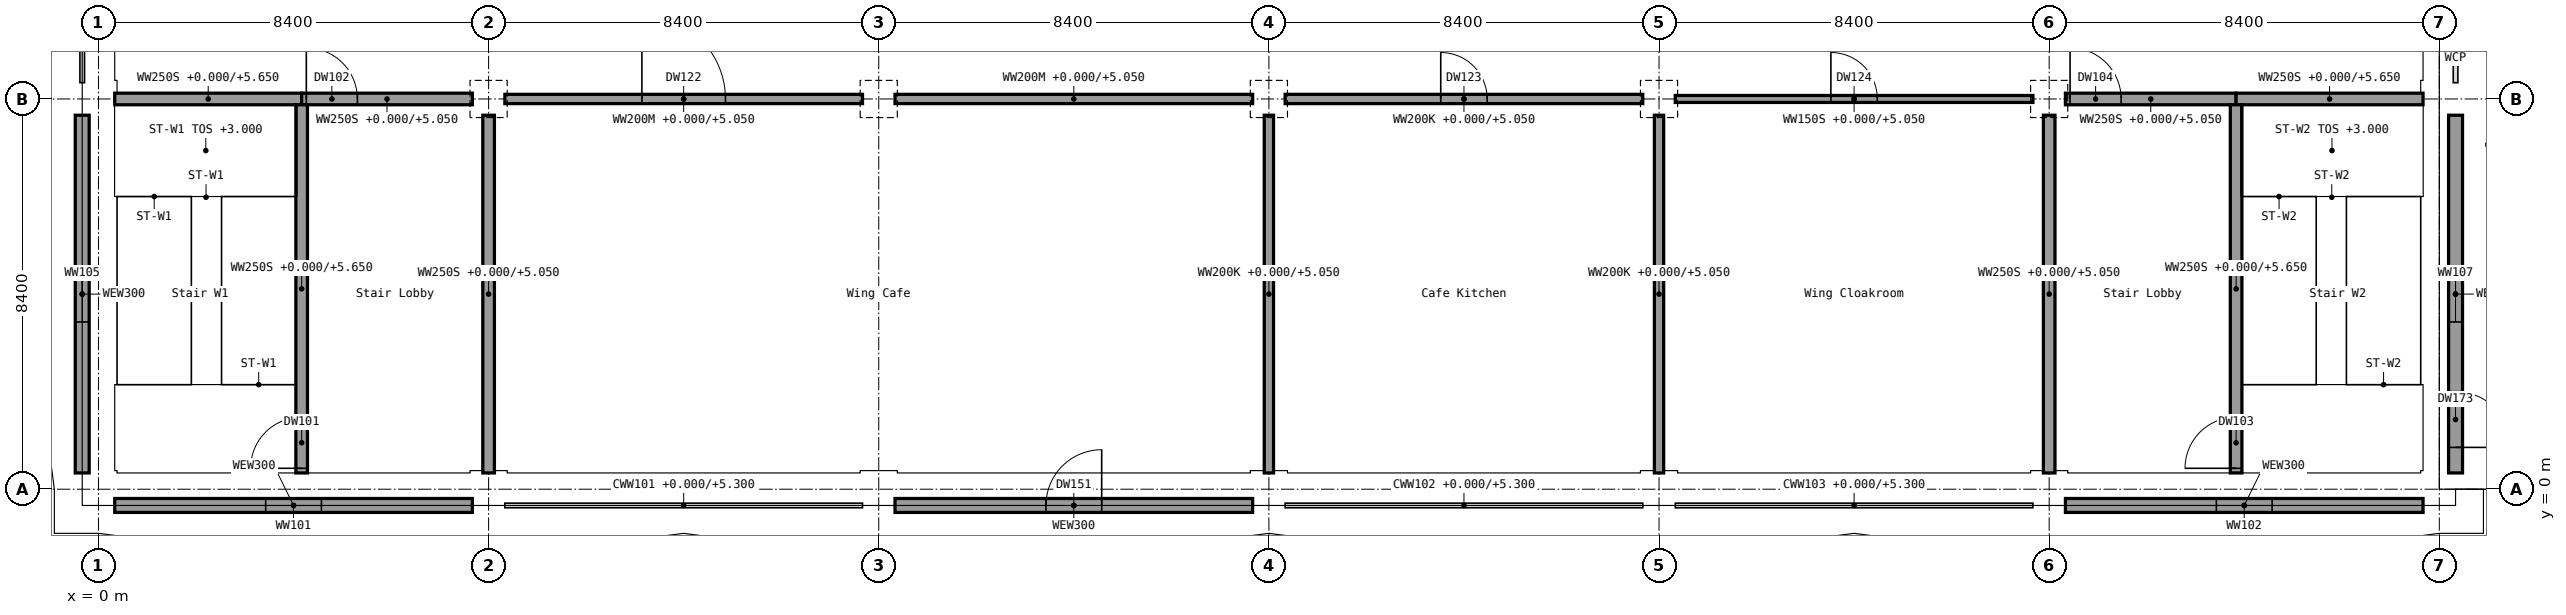
"""IFC4 building model, lengths in metres.
Left out: names, types, materials, properties, quantities, classifications, styles, units other than length and angle.
Written with IfcOpenShell. Run it as: python <this file> out.ifc"""

import sys

from ifc_helpers import new_model, si_unit, direction, frame, frame_2d, origin, origin_2d, place, context, subcontext, project, spatial, rectangle, extrude, element, fill, save


model = new_model("IFC4")
c1 = context("Model", 3, precision=1e-05, world=origin(), true_north=direction((0.0, 1.0)))
c2 = subcontext(c1, "Body", "Model", "MODEL_VIEW")
j1 = project(units=[si_unit("LENGTHUNIT", "METRE"), si_unit("PLANEANGLEUNIT", "RADIAN")], contexts=[c1])
p1 = place(None, origin())
s1 = spatial("IfcSite", under=j1, at=p1, CompositionType="ELEMENT")
p2 = place(p1, origin())
s2 = spatial("IfcBuilding", under=s1, at=p2, CompositionType="ELEMENT")
p3 = place(p2, origin())
s3 = spatial("IfcBuildingStorey", under=s2, at=p3, CompositionType="ELEMENT", Elevation=0.0)
for number, where, z_axis, x_axis in (
    (1, (0.0, 0.0, 0.0), (0.0, 0.0, 1.0), (1.0, 0.0, 0.0)),
    (2, (0.0, 8.4, 0.0), (0.0, 0.0, 1.0), (1.0, 0.0, 0.0)),
    (3, (8.4, 0.0, 0.0), (0.0, 0.0, 1.0), (1.0, 0.0, 0.0)),
    (4, (8.4, 8.4, 0.0), (0.0, 0.0, 1.0), (1.0, 0.0, 0.0)),
    (5, (16.8, 0.0, 0.0), (0.0, 0.0, 1.0), (1.0, 0.0, 0.0)),
    (6, (16.8, 8.4, 0.0), (0.0, 0.0, 1.0), (1.0, 0.0, 0.0)),
    (7, (25.2, 0.0, 0.0), (0.0, 0.0, 1.0), (1.0, 0.0, 0.0)),
    (8, (25.2, 8.4, 0.0), (0.0, 0.0, 1.0), (1.0, 0.0, 0.0)),
    (9, (33.6, 0.0, 0.0), (0.0, 0.0, 1.0), (1.0, 0.0, 0.0)),
    (10, (33.6, 8.4, 0.0), (0.0, 0.0, 1.0), (1.0, 0.0, 0.0)),
    (11, (42.0, 0.0, 0.0), (0.0, 0.0, 1.0), (1.0, 0.0, 0.0)),
    (12, (42.0, 8.4, 0.0), (0.0, 0.0, 1.0), (1.0, 0.0, 0.0)),
    (13, (50.4, 0.0, 0.0), (0.0, 0.0, 1.0), (1.0, 0.0, 0.0)),
    (14, (50.4, 8.4, 0.0), (0.0, 0.0, 1.0), (1.0, 0.0, 0.0)),
):
    element("IfcColumn", number, at=place(p3, frame(where, z_axis=z_axis, x_axis=x_axis)), inside=s3, PredefinedType="COLUMN", context=c2, shape_type="SweptSolid", body=[
        extrude(rectangle(XDim=0.7, YDim=0.7, at=origin_2d()), origin(), (0.0, 0.0, 1.0), 6.0),
    ])
p4 = place(p3, frame((0.35, -0.35, 0.0), z_axis=(0.0, 0.0, 1.0), x_axis=(1.0, 0.0, 0.0)))
e15 = element("IfcWall", 15, at=p4, inside=s3, PredefinedType="SOLIDWALL", context=c2, shape_type="SweptSolid", body=[
    extrude(rectangle(XDim=7.7, YDim=0.3, at=frame_2d((3.85, 0.0))), origin(), (0.0, 0.0, 1.0), 5.3),
])
p5 = place(p4, frame((3.25, 0.0, 1.0)))
e16 = element("IfcOpeningElement", 16, at=p5, cuts=e15, PredefinedType="OPENING", context=c2, shape_type="SweptSolid", body=[
    extrude(rectangle(XDim=1.2, YDim=1.5, at=frame_2d((0.6, 0.75))), frame((0.0, 0.15, 0.0), z_axis=(0.0, -1.0, 0.0), x_axis=(1.0, 0.0, 0.0)), (0.0, 0.0, 1.0), 0.3),
])
p6 = place(p3, frame((17.15, -0.35, 0.0), z_axis=(0.0, 0.0, 1.0), x_axis=(1.0, 0.0, 0.0)))
e17 = element("IfcWall", 17, at=p6, inside=s3, PredefinedType="SOLIDWALL", context=c2, shape_type="SweptSolid", body=[
    extrude(rectangle(XDim=7.7, YDim=0.3, at=frame_2d((3.85, 0.0))), origin(), (0.0, 0.0, 1.0), 5.3),
])
p7 = place(p6, frame((3.25, 0.0, 0.0)))
e18 = element("IfcOpeningElement", 18, at=p7, cuts=e17, PredefinedType="OPENING", context=c2, shape_type="SweptSolid", body=[
    extrude(rectangle(XDim=1.2, YDim=2.1, at=frame_2d((0.6, 1.05))), frame((0.0, 0.15, 0.0), z_axis=(0.0, -1.0, 0.0), x_axis=(1.0, 0.0, 0.0)), (0.0, 0.0, 1.0), 0.3),
])
p8 = place(p3, frame((42.35, -0.35, 0.0), z_axis=(0.0, 0.0, 1.0), x_axis=(1.0, 0.0, 0.0)))
e19 = element("IfcWall", 19, at=p8, inside=s3, PredefinedType="SOLIDWALL", context=c2, shape_type="SweptSolid", body=[
    extrude(rectangle(XDim=7.7, YDim=0.3, at=frame_2d((3.85, 0.0))), origin(), (0.0, 0.0, 1.0), 5.3),
])
p9 = place(p8, frame((3.25, 0.0, 1.0)))
e20 = element("IfcOpeningElement", 20, at=p9, cuts=e19, PredefinedType="OPENING", context=c2, shape_type="SweptSolid", body=[
    extrude(rectangle(XDim=1.2, YDim=1.5, at=frame_2d((0.6, 0.75))), frame((0.0, 0.15, 0.0), z_axis=(0.0, -1.0, 0.0), x_axis=(1.0, 0.0, 0.0)), (0.0, 0.0, 1.0), 0.3),
])
p10 = place(p3, frame((-0.35, 0.35, 0.0), z_axis=(0.0, 0.0, 1.0), x_axis=(0.0, 1.0, 0.0)))
e21 = element("IfcWall", 21, at=p10, inside=s3, PredefinedType="SOLIDWALL", context=c2, shape_type="SweptSolid", body=[
    extrude(rectangle(XDim=7.7, YDim=0.3, at=frame_2d((3.85, 0.0))), origin(), (0.0, 0.0, 1.0), 5.3),
])
p11 = place(p10, frame((3.25, 0.0, 1.0)))
e22 = element("IfcOpeningElement", 22, at=p11, cuts=e21, PredefinedType="OPENING", context=c2, shape_type="SweptSolid", body=[
    extrude(rectangle(XDim=1.2, YDim=1.5, at=frame_2d((0.6, 0.75))), frame((0.0, 0.15, 0.0), z_axis=(0.0, -1.0, 0.0), x_axis=(1.0, 0.0, 0.0)), (0.0, 0.0, 1.0), 0.3),
])
p12 = place(p3, frame((50.75, 0.35, 0.0), z_axis=(0.0, 0.0, 1.0), x_axis=(0.0, 1.0, 0.0)))
e23 = element("IfcWall", 23, at=p12, inside=s3, PredefinedType="SOLIDWALL", context=c2, shape_type="SweptSolid", body=[
    extrude(rectangle(XDim=7.7, YDim=0.3, at=frame_2d((3.85, 0.0))), origin(), (0.0, 0.0, 1.0), 5.3),
])
p13 = place(p12, frame((3.25, 0.0, 1.0)))
e24 = element("IfcOpeningElement", 24, at=p13, cuts=e23, PredefinedType="OPENING", context=c2, shape_type="SweptSolid", body=[
    extrude(rectangle(XDim=1.2, YDim=1.5, at=frame_2d((0.6, 0.75))), frame((0.0, 0.15, 0.0), z_axis=(0.0, -1.0, 0.0), x_axis=(1.0, 0.0, 0.0)), (0.0, 0.0, 1.0), 0.3),
])
p14 = place(p12, frame((0.55, 0.0, 0.0)))
e25 = element("IfcOpeningElement", 25, at=p14, cuts=e23, PredefinedType="OPENING", context=c2, shape_type="SweptSolid", body=[
    extrude(rectangle(XDim=1.2, YDim=2.1, at=frame_2d((0.6, 1.05))), frame((0.0, 0.15, 0.0), z_axis=(0.0, -1.0, 0.0), x_axis=(1.0, 0.0, 0.0)), (0.0, 0.0, 1.0), 0.3),
])
p15 = place(p3, frame((0.35, 8.4, 0.0), z_axis=(0.0, 0.0, 1.0), x_axis=(1.0, 0.0, 0.0)))
e26 = element("IfcWall", 26, at=p15, inside=s3, PredefinedType="SHEAR", context=c2, shape_type="SweptSolid", body=[
    extrude(rectangle(XDim=4.025, YDim=0.25, at=frame_2d((2.012, 0.0))), origin(), (0.0, 0.0, 1.0), 5.65),
])
p16 = place(p3, frame((4.375, 8.4, 0.0), z_axis=(0.0, 0.0, 1.0), x_axis=(1.0, 0.0, 0.0)))
e27 = element("IfcWall", 27, at=p16, inside=s3, PredefinedType="SHEAR", context=c2, shape_type="SweptSolid", body=[
    extrude(rectangle(XDim=3.675, YDim=0.25, at=frame_2d((1.837, 0.0))), origin(), (0.0, 0.0, 1.0), 5.05),
])
p17 = place(p16, frame((0.1, 0.0, 0.0)))
e28 = element("IfcOpeningElement", 28, at=p17, cuts=e27, PredefinedType="OPENING", context=c2, shape_type="SweptSolid", body=[
    extrude(rectangle(XDim=1.1, YDim=2.1, at=frame_2d((0.55, 1.05))), frame((0.0, 0.125, 0.0), z_axis=(0.0, -1.0, 0.0), x_axis=(1.0, 0.0, 0.0)), (0.0, 0.0, 1.0), 0.25),
])
p18 = place(p3, frame((8.75, 8.4, 0.0), z_axis=(0.0, 0.0, 1.0), x_axis=(1.0, 0.0, 0.0)))
e29 = element("IfcWall", 29, at=p18, inside=s3, PredefinedType="PARTITIONING", context=c2, shape_type="SweptSolid", body=[
    extrude(rectangle(XDim=7.7, YDim=0.2, at=frame_2d((3.85, 0.0))), origin(), (0.0, 0.0, 1.0), 5.05),
])
p19 = place(p18, frame((2.95, 0.0, 0.0)))
e30 = element("IfcOpeningElement", 30, at=p19, cuts=e29, PredefinedType="OPENING", context=c2, shape_type="SweptSolid", body=[
    extrude(rectangle(XDim=1.8, YDim=2.1, at=frame_2d((0.9, 1.05))), frame((0.0, 0.1, 0.0), z_axis=(0.0, -1.0, 0.0), x_axis=(1.0, 0.0, 0.0)), (0.0, 0.0, 1.0), 0.2),
])
p20 = place(p3, frame((17.15, 8.4, 0.0), z_axis=(0.0, 0.0, 1.0), x_axis=(1.0, 0.0, 0.0)))
e31 = element("IfcWall", 31, at=p20, inside=s3, PredefinedType="PARTITIONING", context=c2, shape_type="SweptSolid", body=[
    extrude(rectangle(XDim=7.7, YDim=0.2, at=frame_2d((3.85, 0.0))), origin(), (0.0, 0.0, 1.0), 5.05),
])
p21 = place(p3, frame((25.55, 8.4, 0.0), z_axis=(0.0, 0.0, 1.0), x_axis=(1.0, 0.0, 0.0)))
e32 = element("IfcWall", 32, at=p21, inside=s3, PredefinedType="SOLIDWALL", context=c2, shape_type="SweptSolid", body=[
    extrude(rectangle(XDim=7.7, YDim=0.2, at=frame_2d((3.85, 0.0))), origin(), (0.0, 0.0, 1.0), 5.05),
])
p22 = place(p21, frame((3.35, 0.0, 0.0)))
e33 = element("IfcOpeningElement", 33, at=p22, cuts=e32, PredefinedType="OPENING", context=c2, shape_type="SweptSolid", body=[
    extrude(rectangle(XDim=1.0, YDim=2.1, at=frame_2d((0.5, 1.05))), frame((0.0, 0.1, 0.0), z_axis=(0.0, -1.0, 0.0), x_axis=(1.0, 0.0, 0.0)), (0.0, 0.0, 1.0), 0.2),
])
p23 = place(p3, frame((33.95, 8.4, 0.0), z_axis=(0.0, 0.0, 1.0), x_axis=(1.0, 0.0, 0.0)))
e34 = element("IfcWall", 34, at=p23, inside=s3, PredefinedType="PARTITIONING", context=c2, shape_type="SweptSolid", body=[
    extrude(rectangle(XDim=7.7, YDim=0.15, at=frame_2d((3.85, 0.0))), origin(), (0.0, 0.0, 1.0), 5.05),
])
p24 = place(p23, frame((3.35, 0.0, 0.0)))
e35 = element("IfcOpeningElement", 35, at=p24, cuts=e34, PredefinedType="OPENING", context=c2, shape_type="SweptSolid", body=[
    extrude(rectangle(XDim=1.0, YDim=2.1, at=frame_2d((0.5, 1.05))), frame((0.0, 0.075, 0.0), z_axis=(0.0, -1.0, 0.0), x_axis=(1.0, 0.0, 0.0)), (0.0, 0.0, 1.0), 0.15),
])
p25 = place(p3, frame((42.35, 8.4, 0.0), z_axis=(0.0, 0.0, 1.0), x_axis=(1.0, 0.0, 0.0)))
e36 = element("IfcWall", 36, at=p25, inside=s3, PredefinedType="SHEAR", context=c2, shape_type="SweptSolid", body=[
    extrude(rectangle(XDim=3.675, YDim=0.25, at=frame_2d((1.837, 0.0))), origin(), (0.0, 0.0, 1.0), 5.05),
])
p26 = place(p25, frame((0.1, 0.0, 0.0)))
e37 = element("IfcOpeningElement", 37, at=p26, cuts=e36, PredefinedType="OPENING", context=c2, shape_type="SweptSolid", body=[
    extrude(rectangle(XDim=1.1, YDim=2.1, at=frame_2d((0.55, 1.05))), frame((0.0, 0.125, 0.0), z_axis=(0.0, -1.0, 0.0), x_axis=(1.0, 0.0, 0.0)), (0.0, 0.0, 1.0), 0.25),
])
p27 = place(p3, frame((46.025, 8.4, 0.0), z_axis=(0.0, 0.0, 1.0), x_axis=(1.0, 0.0, 0.0)))
e38 = element("IfcWall", 38, at=p27, inside=s3, PredefinedType="SHEAR", context=c2, shape_type="SweptSolid", body=[
    extrude(rectangle(XDim=4.025, YDim=0.25, at=frame_2d((2.013, 0.0))), origin(), (0.0, 0.0, 1.0), 5.65),
])
p28 = place(p3, frame((4.375, 0.35, 0.0), z_axis=(0.0, 0.0, 1.0), x_axis=(0.0, 1.0, 0.0)))
e39 = element("IfcWall", 39, at=p28, inside=s3, PredefinedType="SHEAR", context=c2, shape_type="SweptSolid", body=[
    extrude(rectangle(XDim=7.925, YDim=0.25, at=frame_2d((3.962, 0.0))), origin(), (0.0, 0.0, 1.0), 5.65),
])
p29 = place(p28, frame((0.1, 0.0, 0.0)))
e40 = element("IfcOpeningElement", 40, at=p29, cuts=e39, PredefinedType="OPENING", context=c2, shape_type="SweptSolid", body=[
    extrude(rectangle(XDim=1.1, YDim=2.1, at=frame_2d((0.55, 1.05))), frame((0.0, 0.125, 0.0), z_axis=(0.0, -1.0, 0.0), x_axis=(1.0, 0.0, 0.0)), (0.0, 0.0, 1.0), 0.25),
])
p30 = place(p3, frame((8.4, 0.35, 0.0), z_axis=(0.0, 0.0, 1.0), x_axis=(0.0, 1.0, 0.0)))
e41 = element("IfcWall", 41, at=p30, inside=s3, PredefinedType="SHEAR", context=c2, shape_type="SweptSolid", body=[
    extrude(rectangle(XDim=7.7, YDim=0.25, at=frame_2d((3.85, 0.0))), origin(), (0.0, 0.0, 1.0), 5.05),
])
for number, where, z_axis, x_axis in (
    (42, (25.2, 0.35, 0.0), (0.0, 0.0, 1.0), (0.0, 1.0, 0.0)),
    (43, (33.6, 0.35, 0.0), (0.0, 0.0, 1.0), (0.0, 1.0, 0.0)),
):
    element("IfcWall", number, at=place(p3, frame(where, z_axis=z_axis, x_axis=x_axis)), inside=s3, PredefinedType="SOLIDWALL", context=c2, shape_type="SweptSolid", body=[
        extrude(rectangle(XDim=7.7, YDim=0.2, at=frame_2d((3.85, 0.0))), origin(), (0.0, 0.0, 1.0), 5.05),
    ])
p31 = place(p3, frame((42.0, 0.35, 0.0), z_axis=(0.0, 0.0, 1.0), x_axis=(0.0, 1.0, 0.0)))
e44 = element("IfcWall", 44, at=p31, inside=s3, PredefinedType="SHEAR", context=c2, shape_type="SweptSolid", body=[
    extrude(rectangle(XDim=7.7, YDim=0.25, at=frame_2d((3.85, 0.0))), origin(), (0.0, 0.0, 1.0), 5.05),
])
p32 = place(p3, frame((46.025, 0.35, 0.0), z_axis=(0.0, 0.0, 1.0), x_axis=(0.0, 1.0, 0.0)))
e45 = element("IfcWall", 45, at=p32, inside=s3, PredefinedType="SHEAR", context=c2, shape_type="SweptSolid", body=[
    extrude(rectangle(XDim=7.925, YDim=0.25, at=frame_2d((3.962, 0.0))), origin(), (0.0, 0.0, 1.0), 5.65),
])
p33 = place(p32, frame((0.1, 0.0, 0.0)))
e46 = element("IfcOpeningElement", 46, at=p33, cuts=e45, PredefinedType="OPENING", context=c2, shape_type="SweptSolid", body=[
    extrude(rectangle(XDim=1.1, YDim=2.1, at=frame_2d((0.55, 1.05))), frame((0.0, 0.125, 0.0), z_axis=(0.0, -1.0, 0.0), x_axis=(1.0, 0.0, 0.0)), (0.0, 0.0, 1.0), 0.25),
])
p34 = place(p5, origin())
e47 = element("IfcWindow", 47, at=p34, inside=s3, PartitioningType="SINGLE_PANEL", PredefinedType="WINDOW", context=c2, shape_type="SweptSolid", body=[
    extrude(rectangle(XDim=1.2, YDim=1.5, at=frame_2d((0.6, 0.75))), frame((0.0, 0.03, 0.0), z_axis=(0.0, -1.0, 0.0), x_axis=(1.0, 0.0, 0.0)), (0.0, 0.0, 1.0), 0.06),
])
fill(e16, e47)
p35 = place(p7, origin())
e48 = element("IfcDoor", 48, at=p35, inside=s3, OperationType="SINGLE_SWING_RIGHT", PredefinedType="DOOR", context=c2, shape_type="SweptSolid", body=[
    extrude(rectangle(XDim=1.2, YDim=2.1, at=frame_2d((0.6, 1.05))), frame((0.0, 0.025, 0.0), z_axis=(0.0, -1.0, 0.0), x_axis=(1.0, 0.0, 0.0)), (0.0, 0.0, 1.0), 0.05),
])
fill(e18, e48)
p36 = place(p9, origin())
e49 = element("IfcWindow", 49, at=p36, inside=s3, PartitioningType="SINGLE_PANEL", PredefinedType="WINDOW", context=c2, shape_type="SweptSolid", body=[
    extrude(rectangle(XDim=1.2, YDim=1.5, at=frame_2d((0.6, 0.75))), frame((0.0, 0.03, 0.0), z_axis=(0.0, -1.0, 0.0), x_axis=(1.0, 0.0, 0.0)), (0.0, 0.0, 1.0), 0.06),
])
fill(e20, e49)
p37 = place(p11, origin())
e50 = element("IfcWindow", 50, at=p37, inside=s3, PartitioningType="SINGLE_PANEL", PredefinedType="WINDOW", context=c2, shape_type="SweptSolid", body=[
    extrude(rectangle(XDim=1.2, YDim=1.5, at=frame_2d((0.6, 0.75))), frame((0.0, 0.03, 0.0), z_axis=(0.0, -1.0, 0.0), x_axis=(1.0, 0.0, 0.0)), (0.0, 0.0, 1.0), 0.06),
])
fill(e22, e50)
p38 = place(p13, origin())
e51 = element("IfcWindow", 51, at=p38, inside=s3, PartitioningType="SINGLE_PANEL", PredefinedType="WINDOW", context=c2, shape_type="SweptSolid", body=[
    extrude(rectangle(XDim=1.2, YDim=1.5, at=frame_2d((0.6, 0.75))), frame((0.0, 0.03, 0.0), z_axis=(0.0, -1.0, 0.0), x_axis=(1.0, 0.0, 0.0)), (0.0, 0.0, 1.0), 0.06),
])
fill(e24, e51)
p39 = place(p14, frame((1.2, 0.0, 0.0), z_axis=(0.0, 0.0, 1.0), x_axis=(-1.0, 0.0, 0.0)))
e52 = element("IfcDoor", 52, at=p39, inside=s3, OperationType="SINGLE_SWING_RIGHT", PredefinedType="DOOR", context=c2, shape_type="SweptSolid", body=[
    extrude(rectangle(XDim=1.2, YDim=2.1, at=frame_2d((0.6, 1.05))), frame((0.0, 0.025, 0.0), z_axis=(0.0, -1.0, 0.0), x_axis=(1.0, 0.0, 0.0)), (0.0, 0.0, 1.0), 0.05),
])
fill(e25, e52)
p40 = place(p29, origin())
e53 = element("IfcDoor", 53, at=p40, inside=s3, OperationType="SINGLE_SWING_LEFT", PredefinedType="DOOR", context=c2, shape_type="SweptSolid", body=[
    extrude(rectangle(XDim=1.1, YDim=2.1, at=frame_2d((0.55, 1.05))), frame((0.0, 0.025, 0.0), z_axis=(0.0, -1.0, 0.0), x_axis=(1.0, 0.0, 0.0)), (0.0, 0.0, 1.0), 0.05),
])
fill(e40, e53)
p41 = place(p17, origin())
e54 = element("IfcDoor", 54, at=p41, inside=s3, OperationType="SINGLE_SWING_LEFT", PredefinedType="DOOR", context=c2, shape_type="SweptSolid", body=[
    extrude(rectangle(XDim=1.1, YDim=2.1, at=frame_2d((0.55, 1.05))), frame((0.0, 0.025, 0.0), z_axis=(0.0, -1.0, 0.0), x_axis=(1.0, 0.0, 0.0)), (0.0, 0.0, 1.0), 0.05),
])
fill(e28, e54)
p42 = place(p33, origin())
e55 = element("IfcDoor", 55, at=p42, inside=s3, OperationType="SINGLE_SWING_LEFT", PredefinedType="DOOR", context=c2, shape_type="SweptSolid", body=[
    extrude(rectangle(XDim=1.1, YDim=2.1, at=frame_2d((0.55, 1.05))), frame((0.0, 0.025, 0.0), z_axis=(0.0, -1.0, 0.0), x_axis=(1.0, 0.0, 0.0)), (0.0, 0.0, 1.0), 0.05),
])
fill(e46, e55)
p43 = place(p26, origin())
e56 = element("IfcDoor", 56, at=p43, inside=s3, OperationType="SINGLE_SWING_LEFT", PredefinedType="DOOR", context=c2, shape_type="SweptSolid", body=[
    extrude(rectangle(XDim=1.1, YDim=2.1, at=frame_2d((0.55, 1.05))), frame((0.0, 0.025, 0.0), z_axis=(0.0, -1.0, 0.0), x_axis=(1.0, 0.0, 0.0)), (0.0, 0.0, 1.0), 0.05),
])
fill(e37, e56)
p44 = place(p19, origin())
e57 = element("IfcDoor", 57, at=p44, inside=s3, OperationType="DOUBLE_DOOR_DOUBLE_SWING", PredefinedType="DOOR", context=c2, shape_type="SweptSolid", body=[
    extrude(rectangle(XDim=1.8, YDim=2.1, at=frame_2d((0.9, 1.05))), frame((0.0, 0.025, 0.0), z_axis=(0.0, -1.0, 0.0), x_axis=(1.0, 0.0, 0.0)), (0.0, 0.0, 1.0), 0.05),
])
fill(e30, e57)
p45 = place(p22, origin())
e58 = element("IfcDoor", 58, at=p45, inside=s3, OperationType="SINGLE_SWING_LEFT", PredefinedType="DOOR", context=c2, shape_type="SweptSolid", body=[
    extrude(rectangle(XDim=1.0, YDim=2.1, at=frame_2d((0.5, 1.05))), frame((0.0, 0.025, 0.0), z_axis=(0.0, -1.0, 0.0), x_axis=(1.0, 0.0, 0.0)), (0.0, 0.0, 1.0), 0.05),
])
fill(e33, e58)
p46 = place(p24, origin())
e59 = element("IfcDoor", 59, at=p46, inside=s3, OperationType="SINGLE_SWING_LEFT", PredefinedType="DOOR", context=c2, shape_type="SweptSolid", body=[
    extrude(rectangle(XDim=1.0, YDim=2.1, at=frame_2d((0.5, 1.05))), frame((0.0, 0.025, 0.0), z_axis=(0.0, -1.0, 0.0), x_axis=(1.0, 0.0, 0.0)), (0.0, 0.0, 1.0), 0.05),
])
fill(e35, e59)
save(model, sys.argv[1])
